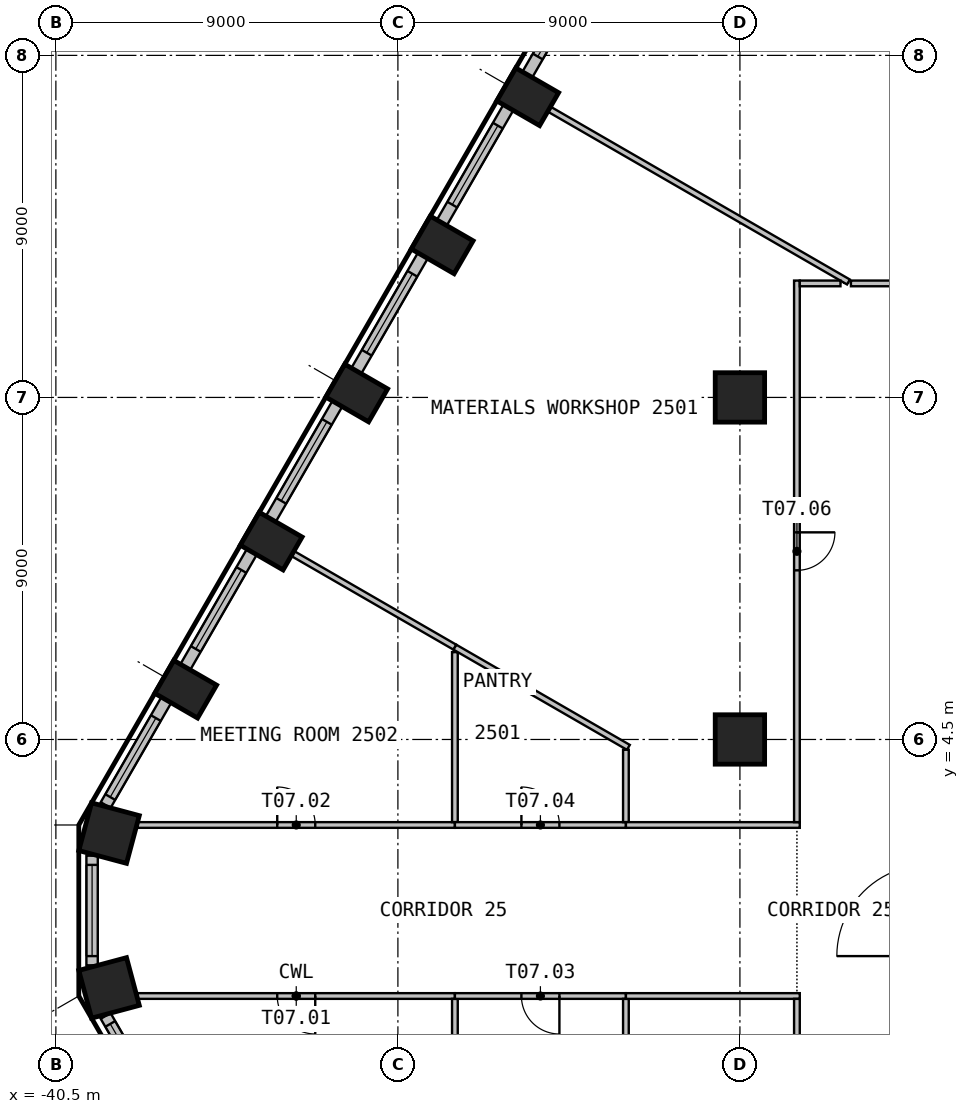
"""IFC4 building model, lengths in metres.
Left out: names, types, materials, properties, quantities, classifications, styles, units other than length and angle.
Written with IfcOpenShell. Run it as: python <this file> out.ifc"""

import sys

from ifc_helpers import new_model, si_unit, direction, frame, frame_2d, origin, origin_2d, place, context, subcontext, project, spatial, rectangle, circle, extrude, element, fill, save


model = new_model("IFC4")
c1 = context("Model", 3, precision=1e-05, world=origin(), true_north=direction((0.0, 1.0)))
c2 = subcontext(c1, "Body", "Model", "MODEL_VIEW")
j1 = project(units=[si_unit("LENGTHUNIT", "METRE"), si_unit("PLANEANGLEUNIT", "RADIAN")], contexts=[c1])
p1 = place(None, origin())
s1 = spatial("IfcSite", under=j1, at=p1, CompositionType="ELEMENT")
p2 = place(p1, origin())
s2 = spatial("IfcBuilding", under=s1, at=p2, CompositionType="ELEMENT")
p3 = place(p2, frame((0.0, 0.0, 104.7)))
s3 = spatial("IfcBuildingStorey", under=s2, at=p3, CompositionType="ELEMENT", Elevation=104.7)
for number, where, z_axis, x_axis in (
    (1, (-28.084, 21.411, 0.0), (0.0, 0.0, 1.0), (-0.5, -0.866, 0.0)),
    (2, (-30.334, 17.513, 0.0), (0.0, 0.0, 1.0), (-0.5, -0.866, 0.0)),
    (3, (-32.584, 13.616, 0.0), (0.0, 0.0, 1.0), (-0.5, -0.866, 0.0)),
    (4, (-34.834, 9.719, 0.0), (0.0, 0.0, 1.0), (-0.5, -0.866, 0.0)),
    (5, (-37.084, 5.822, 0.0), (0.0, 0.0, 1.0), (-0.5, -0.866, 0.0)),
):
    element("IfcColumn", number, at=place(p3, frame(where, z_axis=z_axis, x_axis=x_axis)), inside=s3, PredefinedType="COLUMN", context=c2, shape_type="SweptSolid", body=[
        extrude(rectangle(XDim=1.0, YDim=1.3, at=origin_2d()), origin(), (0.0, 0.0, 1.0), 3.525),
    ])
for number, where, z_axis, x_axis in (
    (6, (-39.101, 2.037, 0.0), (0.0, 0.0, 1.0), (-0.259, -0.966, 0.0)),
    (7, (-39.101, -2.037, 0.0), (0.0, 0.0, 1.0), (0.259, -0.966, 0.0)),
):
    element("IfcColumn", number, at=place(p3, frame(where, z_axis=z_axis, x_axis=x_axis)), inside=s3, PredefinedType="COLUMN", context=c2, shape_type="SweptSolid", body=[
        extrude(rectangle(XDim=1.3, YDim=1.3, at=origin_2d()), origin(), (0.0, 0.0, 1.0), 3.525),
    ])
for number, where, z_axis, x_axis in (
    (8, (-22.5, 4.5, 0.0), (0.0, 0.0, 1.0), (1.0, 0.0, 0.0)),
    (9, (-22.5, 13.5, 0.0), (0.0, 0.0, 1.0), (1.0, 0.0, 0.0)),
):
    element("IfcColumn", number, at=place(p3, frame(where, z_axis=z_axis, x_axis=x_axis)), inside=s3, PredefinedType="COLUMN", context=c2, shape_type="SweptSolid", body=[
        extrude(circle(Radius=0.65, at=origin_2d()), origin(), (0.0, 0.0, 1.0), 3.525),
    ])
p4 = place(p3, frame((-26.344, 25.024, 0.0), z_axis=(0.0, 0.0, 1.0), x_axis=(-0.499996256241, -0.866027565234, 0.0)))
e10 = element("IfcWall", 10, at=p4, inside=s3, PredefinedType="SOLIDWALL", context=c2, shape_type="SweptSolid", body=[
    extrude(rectangle(XDim=3.499, YDim=0.3, at=frame_2d((1.75, 0.0))), origin(), (0.0, 0.0, 1.0), 3.525),
])
p5 = place(p4, frame((0.55, 0.0, 0.9)))
e11 = element("IfcOpeningElement", 11, at=p5, cuts=e10, PredefinedType="OPENING", context=c2, shape_type="SweptSolid", body=[
    extrude(rectangle(XDim=2.4, YDim=2.1, at=frame_2d((1.2, 1.05))), frame((0.0, 0.16, 0.0), z_axis=(0.0, -1.0, 0.0), x_axis=(1.0, 0.0, 0.0)), (0.0, 0.0, 1.0), 0.32),
])
p6 = place(p3, frame((-28.594, 21.127, 0.0), z_axis=(0.0, 0.0, 1.0), x_axis=(-0.499996256241, -0.866027565234, 0.0)))
e12 = element("IfcWall", 12, at=p6, inside=s3, PredefinedType="SOLIDWALL", context=c2, shape_type="SweptSolid", body=[
    extrude(rectangle(XDim=3.499, YDim=0.3, at=frame_2d((1.75, 0.0))), origin(), (0.0, 0.0, 1.0), 3.525),
])
p7 = place(p6, frame((0.55, 0.0, 0.9)))
e13 = element("IfcOpeningElement", 13, at=p7, cuts=e12, PredefinedType="OPENING", context=c2, shape_type="SweptSolid", body=[
    extrude(rectangle(XDim=2.4, YDim=2.1, at=frame_2d((1.2, 1.05))), frame((0.0, 0.16, 0.0), z_axis=(0.0, -1.0, 0.0), x_axis=(1.0, 0.0, 0.0)), (0.0, 0.0, 1.0), 0.32),
])
p8 = place(p3, frame((-30.844, 17.23, 0.0), z_axis=(0.0, 0.0, 1.0), x_axis=(-0.499996256241, -0.866027565234, 0.0)))
e14 = element("IfcWall", 14, at=p8, inside=s3, PredefinedType="SOLIDWALL", context=c2, shape_type="SweptSolid", body=[
    extrude(rectangle(XDim=3.499, YDim=0.3, at=frame_2d((1.75, 0.0))), origin(), (0.0, 0.0, 1.0), 3.525),
])
p9 = place(p8, frame((0.55, 0.0, 0.9)))
e15 = element("IfcOpeningElement", 15, at=p9, cuts=e14, PredefinedType="OPENING", context=c2, shape_type="SweptSolid", body=[
    extrude(rectangle(XDim=2.4, YDim=2.1, at=frame_2d((1.2, 1.05))), frame((0.0, 0.16, 0.0), z_axis=(0.0, -1.0, 0.0), x_axis=(1.0, 0.0, 0.0)), (0.0, 0.0, 1.0), 0.32),
])
p10 = place(p3, frame((-33.094, 13.333, 0.0), z_axis=(0.0, 0.0, 1.0), x_axis=(-0.499996256241, -0.866027565234, 0.0)))
e16 = element("IfcWall", 16, at=p10, inside=s3, PredefinedType="SOLIDWALL", context=c2, shape_type="SweptSolid", body=[
    extrude(rectangle(XDim=3.499, YDim=0.3, at=frame_2d((1.75, 0.0))), origin(), (0.0, 0.0, 1.0), 3.525),
])
p11 = place(p10, frame((0.55, 0.0, 0.9)))
e17 = element("IfcOpeningElement", 17, at=p11, cuts=e16, PredefinedType="OPENING", context=c2, shape_type="SweptSolid", body=[
    extrude(rectangle(XDim=2.4, YDim=2.1, at=frame_2d((1.2, 1.05))), frame((0.0, 0.16, 0.0), z_axis=(0.0, -1.0, 0.0), x_axis=(1.0, 0.0, 0.0)), (0.0, 0.0, 1.0), 0.32),
])
p12 = place(p3, frame((-35.344, 9.436, 0.0), z_axis=(0.0, 0.0, 1.0), x_axis=(-0.499996256241, -0.866027565234, 0.0)))
e18 = element("IfcWall", 18, at=p12, inside=s3, PredefinedType="SOLIDWALL", context=c2, shape_type="SweptSolid", body=[
    extrude(rectangle(XDim=3.499, YDim=0.3, at=frame_2d((1.75, 0.0))), origin(), (0.0, 0.0, 1.0), 3.525),
])
p13 = place(p12, frame((0.55, 0.0, 0.9)))
e19 = element("IfcOpeningElement", 19, at=p13, cuts=e18, PredefinedType="OPENING", context=c2, shape_type="SweptSolid", body=[
    extrude(rectangle(XDim=2.4, YDim=2.1, at=frame_2d((1.2, 1.05))), frame((0.0, 0.16, 0.0), z_axis=(0.0, -1.0, 0.0), x_axis=(1.0, 0.0, 0.0)), (0.0, 0.0, 1.0), 0.32),
])
p14 = place(p3, frame((-37.594, 5.539, 0.0), z_axis=(0.0, 0.0, 1.0), x_axis=(-0.500004907028, -0.866022570692, 0.0)))
e20 = element("IfcWall", 20, at=p14, inside=s3, PredefinedType="SOLIDWALL", context=c2, shape_type="SweptSolid", body=[
    extrude(rectangle(XDim=3.192, YDim=0.3, at=frame_2d((1.596, 0.0))), origin(), (0.0, 0.0, 1.0), 3.525),
])
p15 = place(p14, frame((0.55, 0.0, 0.9)))
e21 = element("IfcOpeningElement", 21, at=p15, cuts=e20, PredefinedType="OPENING", context=c2, shape_type="SweptSolid", body=[
    extrude(rectangle(XDim=2.4, YDim=2.1, at=frame_2d((1.2, 1.05))), frame((0.0, 0.16, 0.0), z_axis=(0.0, -1.0, 0.0), x_axis=(1.0, 0.0, 0.0)), (0.0, 0.0, 1.0), 0.32),
])
p16 = place(p3, frame((-39.547, 1.443, 0.0), z_axis=(0.0, 0.0, 1.0), x_axis=(0.0, -1.0, 0.0)))
e22 = element("IfcWall", 22, at=p16, inside=s3, PredefinedType="SOLIDWALL", context=c2, shape_type="SweptSolid", body=[
    extrude(rectangle(XDim=2.886, YDim=0.3, at=frame_2d((1.443, 0.0))), origin(), (0.0, 0.0, 1.0), 3.525),
])
p17 = place(p16, frame((0.243, 0.0, 0.9)))
e23 = element("IfcOpeningElement", 23, at=p17, cuts=e22, PredefinedType="OPENING", context=c2, shape_type="SweptSolid", body=[
    extrude(rectangle(XDim=2.4, YDim=2.1, at=frame_2d((1.2, 1.05))), frame((0.0, 0.16, 0.0), z_axis=(0.0, -1.0, 0.0), x_axis=(1.0, 0.0, 0.0)), (0.0, 0.0, 1.0), 0.32),
])
p18 = place(p3, frame((-39.19, -2.774, 0.0), z_axis=(0.0, 0.0, 1.0), x_axis=(0.500004907028, -0.866022570692, 0.0)))
e24 = element("IfcWall", 24, at=p18, inside=s3, PredefinedType="SOLIDWALL", context=c2, shape_type="SweptSolid", body=[
    extrude(rectangle(XDim=3.192, YDim=0.3, at=frame_2d((1.596, 0.0))), origin(), (0.0, 0.0, 1.0), 3.525),
])
p19 = place(p18, frame((0.243, 0.0, 0.9)))
e25 = element("IfcOpeningElement", 25, at=p19, cuts=e24, PredefinedType="OPENING", context=c2, shape_type="SweptSolid", body=[
    extrude(rectangle(XDim=2.4, YDim=2.1, at=frame_2d((1.2, 1.05))), frame((0.0, 0.16, 0.0), z_axis=(0.0, -1.0, 0.0), x_axis=(1.0, 0.0, 0.0)), (0.0, 0.0, 1.0), 0.32),
])
p20 = place(p3, frame((-30.0, -2.25, 0.0), z_axis=(0.0, 0.0, 1.0), x_axis=(-1.0, 0.0, 0.0)))
e26 = element("IfcWall", 26, at=p20, inside=s3, PredefinedType="PARTITIONING", context=c2, shape_type="SweptSolid", body=[
    extrude(rectangle(XDim=8.35, YDim=0.15, at=frame_2d((4.175, 0.0))), origin(), (0.0, 0.0, 1.0), 3.525),
])
p21 = place(p20, frame((3.675, 0.0, 0.0)))
e27 = element("IfcOpeningElement", 27, at=p21, cuts=e26, PredefinedType="OPENING", context=c2, shape_type="SweptSolid", body=[
    extrude(rectangle(XDim=1.0, YDim=2.1, at=frame_2d((0.5, 1.05))), frame((0.0, 0.085, 0.0), z_axis=(0.0, -1.0, 0.0), x_axis=(1.0, 0.0, 0.0)), (0.0, 0.0, 1.0), 0.17),
])
p22 = place(p3, frame((-38.35, 2.25, 0.0), z_axis=(0.0, 0.0, 1.0), x_axis=(1.0, 0.0, 0.0)))
e28 = element("IfcWall", 28, at=p22, inside=s3, PredefinedType="PARTITIONING", context=c2, shape_type="SweptSolid", body=[
    extrude(rectangle(XDim=8.35, YDim=0.15, at=frame_2d((4.175, 0.0))), origin(), (0.0, 0.0, 1.0), 3.525),
])
p23 = place(p22, frame((3.675, 0.0, 0.0)))
e29 = element("IfcOpeningElement", 29, at=p23, cuts=e28, PredefinedType="OPENING", context=c2, shape_type="SweptSolid", body=[
    extrude(rectangle(XDim=1.0, YDim=2.1, at=frame_2d((0.5, 1.05))), frame((0.0, 0.085, 0.0), z_axis=(0.0, -1.0, 0.0), x_axis=(1.0, 0.0, 0.0)), (0.0, 0.0, 1.0), 0.17),
])
p24 = place(p3, frame((-34.254, 9.384, 0.0), z_axis=(0.0, 0.0, 1.0), x_axis=(0.865998524286, -0.500046553767, 0.0)))
e30 = element("IfcWall", 30, at=p24, inside=s3, PredefinedType="PARTITIONING", context=c2, shape_type="SweptSolid", body=[
    extrude(rectangle(XDim=4.912, YDim=0.15, at=frame_2d((2.456, 0.0))), origin(), (0.0, 0.0, 1.0), 3.525),
])
p25 = place(p3, frame((-30.0, -2.325, 0.0), z_axis=(0.0, 0.0, 1.0), x_axis=(0.0, -1.0, 0.0)))
e31 = element("IfcWall", 31, at=p25, inside=s3, PredefinedType="PARTITIONING", context=c2, shape_type="SweptSolid", body=[
    extrude(rectangle(XDim=4.473, YDim=0.15, at=frame_2d((2.237, 0.0))), origin(), (0.0, 0.0, 1.0), 3.525),
])
p26 = place(p3, frame((-25.5, -2.25, 0.0), z_axis=(0.0, 0.0, 1.0), x_axis=(-1.0, 0.0, 0.0)))
e32 = element("IfcWall", 32, at=p26, inside=s3, PredefinedType="PARTITIONING", context=c2, shape_type="SweptSolid", body=[
    extrude(rectangle(XDim=4.5, YDim=0.15, at=frame_2d((2.25, 0.0))), origin(), (0.0, 0.0, 1.0), 3.525),
])
p27 = place(p26, frame((1.75, 0.0, 0.0)))
e33 = element("IfcOpeningElement", 33, at=p27, cuts=e32, PredefinedType="OPENING", context=c2, shape_type="SweptSolid", body=[
    extrude(rectangle(XDim=1.0, YDim=2.1, at=frame_2d((0.5, 1.05))), frame((0.0, 0.085, 0.0), z_axis=(0.0, -1.0, 0.0), x_axis=(1.0, 0.0, 0.0)), (0.0, 0.0, 1.0), 0.17),
])
p28 = place(p3, frame((-30.0, 6.798, 0.0), z_axis=(0.0, 0.0, 1.0), x_axis=(0.0, -1.0, 0.0)))
e34 = element("IfcWall", 34, at=p28, inside=s3, PredefinedType="PARTITIONING", context=c2, shape_type="SweptSolid", body=[
    extrude(rectangle(XDim=4.473, YDim=0.15, at=frame_2d((2.237, 0.0))), origin(), (0.0, 0.0, 1.0), 3.525),
])
p29 = place(p3, frame((-30.0, 2.25, 0.0), z_axis=(0.0, 0.0, 1.0), x_axis=(1.0, 0.0, 0.0)))
e35 = element("IfcWall", 35, at=p29, inside=s3, PredefinedType="PARTITIONING", context=c2, shape_type="SweptSolid", body=[
    extrude(rectangle(XDim=4.5, YDim=0.15, at=frame_2d((2.25, 0.0))), origin(), (0.0, 0.0, 1.0), 3.525),
])
p30 = place(p29, frame((1.75, 0.0, 0.0)))
e36 = element("IfcOpeningElement", 36, at=p30, cuts=e35, PredefinedType="OPENING", context=c2, shape_type="SweptSolid", body=[
    extrude(rectangle(XDim=1.0, YDim=2.1, at=frame_2d((0.5, 1.05))), frame((0.0, 0.085, 0.0), z_axis=(0.0, -1.0, 0.0), x_axis=(1.0, 0.0, 0.0)), (0.0, 0.0, 1.0), 0.17),
])
p31 = place(p3, frame((-30.0, 6.928, 0.0), z_axis=(0.0, 0.0, 1.0), x_axis=(0.866031326857, -0.499989740797, 0.0)))
e37 = element("IfcWall", 37, at=p31, inside=s3, PredefinedType="PARTITIONING", context=c2, shape_type="SweptSolid", body=[
    extrude(rectangle(XDim=5.271, YDim=0.15, at=frame_2d((2.635, 0.0))), origin(), (0.0, 0.0, 1.0), 3.525),
])
p32 = place(p3, frame((-27.504, 21.076, 0.0), z_axis=(0.0, 0.0, 1.0), x_axis=(0.866004606565, -0.500036020111, 0.0)))
e38 = element("IfcWall", 38, at=p32, inside=s3, PredefinedType="PARTITIONING", context=c2, shape_type="SweptSolid", body=[
    extrude(rectangle(XDim=9.076, YDim=0.15, at=frame_2d((4.538, 0.0))), origin(), (0.0, 0.0, 1.0), 3.525),
])
p33 = place(p3, frame((-25.5, -2.325, 0.0), z_axis=(0.0, 0.0, 1.0), x_axis=(0.0, -1.0, 0.0)))
e39 = element("IfcWall", 39, at=p33, inside=s3, PredefinedType="PARTITIONING", context=c2, shape_type="SweptSolid", body=[
    extrude(rectangle(XDim=1.905, YDim=0.15, at=frame_2d((0.953, 0.0))), origin(), (0.0, 0.0, 1.0), 3.525),
])
p34 = place(p3, frame((-20.925, -2.25, 0.0), z_axis=(0.0, 0.0, 1.0), x_axis=(-1.0, 0.0, 0.0)))
e40 = element("IfcWall", 40, at=p34, inside=s3, PredefinedType="PARTITIONING", context=c2, shape_type="SweptSolid", body=[
    extrude(rectangle(XDim=4.575, YDim=0.15, at=frame_2d((2.288, 0.0))), origin(), (0.0, 0.0, 1.0), 3.525),
])
p35 = place(p3, frame((-25.5, 4.23, 0.0), z_axis=(0.0, 0.0, 1.0), x_axis=(0.0, -1.0, 0.0)))
e41 = element("IfcWall", 41, at=p35, inside=s3, PredefinedType="PARTITIONING", context=c2, shape_type="SweptSolid", body=[
    extrude(rectangle(XDim=1.905, YDim=0.15, at=frame_2d((0.953, 0.0))), origin(), (0.0, 0.0, 1.0), 3.525),
])
p36 = place(p3, frame((-25.5, 2.25, 0.0), z_axis=(0.0, 0.0, 1.0), x_axis=(1.0, 0.0, 0.0)))
e42 = element("IfcWall", 42, at=p36, inside=s3, PredefinedType="PARTITIONING", context=c2, shape_type="SweptSolid", body=[
    extrude(rectangle(XDim=4.575, YDim=0.15, at=frame_2d((2.288, 0.0))), origin(), (0.0, 0.0, 1.0), 3.525),
])
p37 = place(p3, frame((-21.0, -2.325, 0.0), z_axis=(0.0, 0.0, 1.0), x_axis=(0.0, -1.0, 0.0)))
e43 = element("IfcWall", 43, at=p37, inside=s3, PredefinedType="PARTITIONING", context=c2, shape_type="SweptSolid", body=[
    extrude(rectangle(XDim=14.25, YDim=0.15, at=frame_2d((7.125, 0.0))), origin(), (0.0, 0.0, 1.0), 3.525),
])
p38 = place(p37, frame((6.625, 0.0, 0.0)))
e44 = element("IfcOpeningElement", 44, at=p38, cuts=e43, PredefinedType="OPENING", context=c2, shape_type="SweptSolid", body=[
    extrude(rectangle(XDim=1.0, YDim=2.1, at=frame_2d((0.5, 1.05))), frame((0.0, 0.085, 0.0), z_axis=(0.0, -1.0, 0.0), x_axis=(1.0, 0.0, 0.0)), (0.0, 0.0, 1.0), 0.17),
])
p39 = place(p3, frame((-21.0, 16.575, 0.0), z_axis=(0.0, 0.0, 1.0), x_axis=(0.0, -1.0, 0.0)))
e45 = element("IfcWall", 45, at=p39, inside=s3, PredefinedType="PARTITIONING", context=c2, shape_type="SweptSolid", body=[
    extrude(rectangle(XDim=14.25, YDim=0.15, at=frame_2d((7.125, 0.0))), origin(), (0.0, 0.0, 1.0), 3.525),
])
p40 = place(p39, frame((6.625, 0.0, 0.0)))
e46 = element("IfcOpeningElement", 46, at=p40, cuts=e45, PredefinedType="OPENING", context=c2, shape_type="SweptSolid", body=[
    extrude(rectangle(XDim=1.0, YDim=2.1, at=frame_2d((0.5, 1.05))), frame((0.0, 0.085, 0.0), z_axis=(0.0, -1.0, 0.0), x_axis=(1.0, 0.0, 0.0)), (0.0, 0.0, 1.0), 0.17),
])
p41 = place(p3, frame((-19.854, 16.5, 0.0), z_axis=(0.0, 0.0, 1.0), x_axis=(-1.0, 0.0, 0.0)))
e47 = element("IfcWall", 47, at=p41, inside=s3, PredefinedType="PARTITIONING", context=c2, shape_type="SweptSolid", body=[
    extrude(rectangle(XDim=1.071, YDim=0.15, at=frame_2d((0.536, 0.0))), origin(), (0.0, 0.0, 1.0), 3.525),
])
p42 = place(p3, frame((-11.25, 16.5, 0.0), z_axis=(0.0, 0.0, 1.0), x_axis=(-1.0, 0.0, 0.0)))
e48 = element("IfcWall", 48, at=p42, inside=s3, PredefinedType="PARTITIONING", context=c2, shape_type="SweptSolid", body=[
    extrude(rectangle(XDim=8.329, YDim=0.15, at=frame_2d((4.165, 0.0))), origin(), (0.0, 0.0, 1.0), 3.525),
])
p43 = place(p5, origin())
e49 = element("IfcWindow", 49, at=p43, inside=s3, PartitioningType="SINGLE_PANEL", PredefinedType="WINDOW", context=c2, shape_type="SweptSolid", body=[
    extrude(rectangle(XDim=2.4, YDim=2.1, at=frame_2d((1.2, 1.05))), frame((0.0, 0.03, 0.0), z_axis=(0.0, -1.0, 0.0), x_axis=(1.0, 0.0, 0.0)), (0.0, 0.0, 1.0), 0.06),
])
fill(e11, e49)
p44 = place(p7, origin())
e50 = element("IfcWindow", 50, at=p44, inside=s3, PartitioningType="SINGLE_PANEL", PredefinedType="WINDOW", context=c2, shape_type="SweptSolid", body=[
    extrude(rectangle(XDim=2.4, YDim=2.1, at=frame_2d((1.2, 1.05))), frame((0.0, 0.03, 0.0), z_axis=(0.0, -1.0, 0.0), x_axis=(1.0, 0.0, 0.0)), (0.0, 0.0, 1.0), 0.06),
])
fill(e13, e50)
p45 = place(p9, origin())
e51 = element("IfcWindow", 51, at=p45, inside=s3, PartitioningType="SINGLE_PANEL", PredefinedType="WINDOW", context=c2, shape_type="SweptSolid", body=[
    extrude(rectangle(XDim=2.4, YDim=2.1, at=frame_2d((1.2, 1.05))), frame((0.0, 0.03, 0.0), z_axis=(0.0, -1.0, 0.0), x_axis=(1.0, 0.0, 0.0)), (0.0, 0.0, 1.0), 0.06),
])
fill(e15, e51)
p46 = place(p11, origin())
e52 = element("IfcWindow", 52, at=p46, inside=s3, PartitioningType="SINGLE_PANEL", PredefinedType="WINDOW", context=c2, shape_type="SweptSolid", body=[
    extrude(rectangle(XDim=2.4, YDim=2.1, at=frame_2d((1.2, 1.05))), frame((0.0, 0.03, 0.0), z_axis=(0.0, -1.0, 0.0), x_axis=(1.0, 0.0, 0.0)), (0.0, 0.0, 1.0), 0.06),
])
fill(e17, e52)
p47 = place(p13, origin())
e53 = element("IfcWindow", 53, at=p47, inside=s3, PartitioningType="SINGLE_PANEL", PredefinedType="WINDOW", context=c2, shape_type="SweptSolid", body=[
    extrude(rectangle(XDim=2.4, YDim=2.1, at=frame_2d((1.2, 1.05))), frame((0.0, 0.03, 0.0), z_axis=(0.0, -1.0, 0.0), x_axis=(1.0, 0.0, 0.0)), (0.0, 0.0, 1.0), 0.06),
])
fill(e19, e53)
p48 = place(p15, origin())
e54 = element("IfcWindow", 54, at=p48, inside=s3, PartitioningType="SINGLE_PANEL", PredefinedType="WINDOW", context=c2, shape_type="SweptSolid", body=[
    extrude(rectangle(XDim=2.4, YDim=2.1, at=frame_2d((1.2, 1.05))), frame((0.0, 0.03, 0.0), z_axis=(0.0, -1.0, 0.0), x_axis=(1.0, 0.0, 0.0)), (0.0, 0.0, 1.0), 0.06),
])
fill(e21, e54)
p49 = place(p17, origin())
e55 = element("IfcWindow", 55, at=p49, inside=s3, PartitioningType="SINGLE_PANEL", PredefinedType="WINDOW", context=c2, shape_type="SweptSolid", body=[
    extrude(rectangle(XDim=2.4, YDim=2.1, at=frame_2d((1.2, 1.05))), frame((0.0, 0.03, 0.0), z_axis=(0.0, -1.0, 0.0), x_axis=(1.0, 0.0, 0.0)), (0.0, 0.0, 1.0), 0.06),
])
fill(e23, e55)
p50 = place(p19, origin())
e56 = element("IfcWindow", 56, at=p50, inside=s3, PartitioningType="SINGLE_PANEL", PredefinedType="WINDOW", context=c2, shape_type="SweptSolid", body=[
    extrude(rectangle(XDim=2.4, YDim=2.1, at=frame_2d((1.2, 1.05))), frame((0.0, 0.03, 0.0), z_axis=(0.0, -1.0, 0.0), x_axis=(1.0, 0.0, 0.0)), (0.0, 0.0, 1.0), 0.06),
])
fill(e25, e56)
p51 = place(p21, origin())
e57 = element("IfcDoor", 57, at=p51, inside=s3, OperationType="SINGLE_SWING_RIGHT", PredefinedType="DOOR", context=c2, shape_type="SweptSolid", body=[
    extrude(rectangle(XDim=1.0, YDim=2.1, at=frame_2d((0.5, 1.05))), frame((0.0, 0.025, 0.0), z_axis=(0.0, -1.0, 0.0), x_axis=(1.0, 0.0, 0.0)), (0.0, 0.0, 1.0), 0.05),
])
fill(e27, e57)
p52 = place(p23, origin())
e58 = element("IfcDoor", 58, at=p52, inside=s3, OperationType="SINGLE_SWING_LEFT", PredefinedType="DOOR", context=c2, shape_type="SweptSolid", body=[
    extrude(rectangle(XDim=1.0, YDim=2.1, at=frame_2d((0.5, 1.05))), frame((0.0, 0.025, 0.0), z_axis=(0.0, -1.0, 0.0), x_axis=(1.0, 0.0, 0.0)), (0.0, 0.0, 1.0), 0.05),
])
fill(e29, e58)
p53 = place(p27, origin())
e59 = element("IfcDoor", 59, at=p53, inside=s3, OperationType="SINGLE_SWING_RIGHT", PredefinedType="DOOR", context=c2, shape_type="SweptSolid", body=[
    extrude(rectangle(XDim=1.0, YDim=2.1, at=frame_2d((0.5, 1.05))), frame((0.0, 0.025, 0.0), z_axis=(0.0, -1.0, 0.0), x_axis=(1.0, 0.0, 0.0)), (0.0, 0.0, 1.0), 0.05),
])
fill(e33, e59)
p54 = place(p30, origin())
e60 = element("IfcDoor", 60, at=p54, inside=s3, OperationType="SINGLE_SWING_LEFT", PredefinedType="DOOR", context=c2, shape_type="SweptSolid", body=[
    extrude(rectangle(XDim=1.0, YDim=2.1, at=frame_2d((0.5, 1.05))), frame((0.0, 0.025, 0.0), z_axis=(0.0, -1.0, 0.0), x_axis=(1.0, 0.0, 0.0)), (0.0, 0.0, 1.0), 0.05),
])
fill(e36, e60)
p55 = place(p40, origin())
e61 = element("IfcDoor", 61, at=p55, inside=s3, OperationType="SINGLE_SWING_RIGHT", PredefinedType="DOOR", context=c2, shape_type="SweptSolid", body=[
    extrude(rectangle(XDim=1.0, YDim=2.1, at=frame_2d((0.5, 1.05))), frame((0.0, 0.025, 0.0), z_axis=(0.0, -1.0, 0.0), x_axis=(1.0, 0.0, 0.0)), (0.0, 0.0, 1.0), 0.05),
])
fill(e46, e61)
save(model, sys.argv[1])
